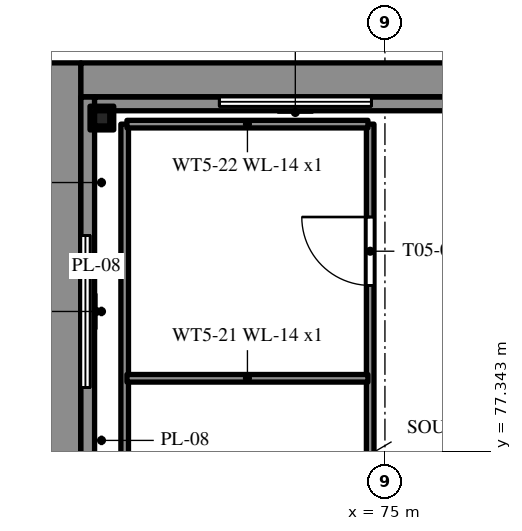
"""IFC4 building model, lengths in metres.
Left out: names, types, materials, properties, quantities, classifications, styles, units other than length and angle.
Written with IfcOpenShell. Run it as: python <this file> out.ifc"""

import sys

from ifc_helpers import new_model, si_unit, direction, frame, frame_2d, origin, origin_2d, place, context, subcontext, project, spatial, polyline, rectangle, hollow_rectangle, i_section, outline, extrude, element, fill, save


model = new_model("IFC4")
c1 = context("Model", 3, precision=1e-05, world=origin(), true_north=direction((0.0, 1.0)))
c2 = subcontext(c1, "Body", "Model", "MODEL_VIEW")
j1 = project(units=[si_unit("LENGTHUNIT", "METRE"), si_unit("PLANEANGLEUNIT", "RADIAN")], contexts=[c1])
p1 = place(None, origin())
s1 = spatial("IfcSite", under=j1, at=p1, CompositionType="ELEMENT")
p2 = place(p1, origin())
s2 = spatial("IfcBuilding", under=s1, at=p2, CompositionType="ELEMENT")
p3 = place(p2, frame((0.0, 0.0, 24.0)))
s3 = spatial("IfcBuildingStorey", under=s2, at=p3, CompositionType="ELEMENT", Elevation=24.0)
p4 = place(p3, frame((70.775, 55.4, 0.0), z_axis=(0.0, 0.0, 1.0), x_axis=(0.0, 1.0, 0.0)))
e1 = element("IfcWall", 1, at=p4, inside=s3, PredefinedType="SOLIDWALL", context=c2, shape_type="SweptSolid", body=[
    extrude(outline(polyline([(0.0, 0.0), (27.05, 0.0), (27.05, 0.5), (25.75, 0.5), (25.664, 0.5), (25.578, 0.5), (22.978, 0.5), (22.899, 0.5), (20.704, 0.5), (20.509, 0.5), (18.742, 0.5), (18.677, 0.5), (17.018, 0.5), (16.956, 0.5), (16.894, 0.5), (13.935, 0.5), (13.871, 0.5), (13.807, 0.5), (11.958, 0.5), (11.896, 0.5), (10.181, 0.5), (10.025, 0.5), (8.455, 0.5), (8.397, 0.5), (6.845, 0.5), (6.789, 0.5), (6.732, 0.5), (3.004, 0.5), (2.947, 0.5), (2.89, 0.5), (1.288, 0.5), (1.232, 0.5), (0.0, 0.5), (0.0, 0.0)])), frame((0.0, 0.225, 0.0), z_axis=(0.0, -1.0, 0.0), x_axis=(1.0, 0.0, 0.0)), (0.0, 0.0, 1.0), 0.45),
])
p5 = place(p3, frame((71.0, 82.225, 0.0), z_axis=(0.0, 0.0, 1.0), x_axis=(1.0, 0.0, 0.0)))
e2 = element("IfcWall", 2, at=p5, inside=s3, PredefinedType="SOLIDWALL", context=c2, shape_type="SweptSolid", body=[
    extrude(outline(polyline([(0.0, 0.0), (26.0, 0.0), (26.0, 0.5), (23.148, 0.5), (22.794, 0.5), (22.44, 0.5), (19.953, 0.5), (19.716, 0.5), (19.631, 0.5), (19.478, 0.5), (19.394, 0.5), (19.157, 0.5), (6.843, 0.5), (6.606, 0.5), (6.522, 0.5), (6.369, 0.5), (6.284, 0.5), (6.047, 0.5), (3.56, 0.5), (3.206, 0.5), (2.852, 0.5), (0.0, 0.5), (0.0, 0.0)])), frame((0.0, 0.225, 0.0), z_axis=(0.0, -1.0, 0.0), x_axis=(1.0, 0.0, 0.0)), (0.0, 0.0, 1.0), 0.45),
])
p6 = place(p3, frame((71.276, 81.724, 0.0), z_axis=(0.0, 0.0, 1.0), x_axis=(1.0, 0.0, 0.0)))
e3 = element("IfcColumn", 3, at=p6, inside=s3, PredefinedType="COLUMN", context=c2, shape_type="SweptSolid", body=[
    extrude(i_section(OverallWidth=0.312, OverallDepth=0.312, WebThickness=0.017, FlangeThickness=0.017, FilletRadius=0.016, at=origin_2d()), origin(), (0.0, 0.0, 1.0), 12.21),
])
p7 = place(p3, frame((71.576, 70.0, 0.0), z_axis=(0.0, 0.0, 1.0), x_axis=(0.0, 1.0, 0.0)))
e4 = element("IfcWall", 4, at=p7, inside=s3, PredefinedType="PARTITIONING", context=c2, shape_type="SweptSolid", body=[
    extrude(rectangle(XDim=11.644, YDim=0.1, at=frame_2d((5.822, 0.0))), origin(), (0.0, 0.0, 1.0), 3.2),
])
p8 = place(p3, frame((74.806, 70.0, 0.0), z_axis=(0.0, 0.0, 1.0), x_axis=(0.0, 1.0, 0.0)))
e5 = element("IfcWall", 5, at=p8, inside=s3, PredefinedType="PARTITIONING", context=c2, shape_type="SweptSolid", body=[
    extrude(rectangle(XDim=11.644, YDim=0.1, at=frame_2d((5.822, 0.0))), origin(), (0.0, 0.0, 1.0), 3.2),
])
p9 = place(p8, frame((1.75, 0.0, 0.0)))
e6 = element("IfcOpeningElement", 6, at=p9, cuts=e5, PredefinedType="OPENING", context=c2, shape_type="SweptSolid", body=[
    extrude(rectangle(XDim=0.9, YDim=2.1, at=frame_2d((0.45, 1.05))), frame((0.0, 0.06, 0.0), z_axis=(0.0, -1.0, 0.0), x_axis=(1.0, 0.0, 0.0)), (0.0, 0.0, 1.0), 0.12),
])
p10 = place(p8, frame((5.9, 0.0, 0.0)))
e7 = element("IfcOpeningElement", 7, at=p10, cuts=e5, PredefinedType="OPENING", context=c2, shape_type="SweptSolid", body=[
    extrude(rectangle(XDim=0.9, YDim=2.1, at=frame_2d((0.45, 1.05))), frame((0.0, 0.06, 0.0), z_axis=(0.0, -1.0, 0.0), x_axis=(1.0, 0.0, 0.0)), (0.0, 0.0, 1.0), 0.12),
])
p11 = place(p8, frame((9.522, 0.0, 0.0)))
e8 = element("IfcOpeningElement", 8, at=p11, cuts=e5, PredefinedType="OPENING", context=c2, shape_type="SweptSolid", body=[
    extrude(rectangle(XDim=0.9, YDim=2.1, at=frame_2d((0.45, 1.05))), frame((0.0, 0.06, 0.0), z_axis=(0.0, -1.0, 0.0), x_axis=(1.0, 0.0, 0.0)), (0.0, 0.0, 1.0), 0.12),
])
for number, where, z_axis, x_axis in (
    (9, (71.606, 78.3, 0.0), (0.0, 0.0, 1.0), (1.0, 0.0, 0.0)),
    (10, (71.606, 81.644, 0.0), (0.0, 0.0, 1.0), (1.0, 0.0, 0.0)),
):
    element("IfcWall", number, at=place(p3, frame(where, z_axis=z_axis, x_axis=x_axis)), inside=s3, PredefinedType="PARTITIONING", context=c2, shape_type="SweptSolid", body=[
        extrude(rectangle(XDim=3.17, YDim=0.1, at=frame_2d((1.585, 0.0))), origin(), (0.0, 0.0, 1.0), 3.2),
    ])
p12 = place(p3, frame((71.06, 56.12, 0.0), z_axis=(0.0, 0.0, 1.0), x_axis=(0.0, 1.0, 0.0)))
e11 = element("IfcWall", 11, at=p12, inside=s3, PredefinedType="STANDARD", context=c2, shape_type="SweptSolid", body=[
    extrude(rectangle(XDim=25.76, YDim=0.12, at=frame_2d((12.88, 0.0))), origin(), (0.0, 0.0, 1.0), 4.0),
])
p13 = place(p12, frame((1.701, 0.0, 1.4)))
e12 = element("IfcOpeningElement", 12, at=p13, cuts=e11, PredefinedType="OPENING", context=c2, shape_type="SweptSolid", body=[
    extrude(rectangle(XDim=2.0, YDim=1.2, at=frame_2d((1.0, 0.6))), frame((0.0, 0.07, 0.0), z_axis=(0.0, -1.0, 0.0), x_axis=(1.0, 0.0, 0.0)), (0.0, 0.0, 1.0), 0.14),
])
p14 = place(p12, frame((11.88, 0.0, 1.4)))
e13 = element("IfcOpeningElement", 13, at=p14, cuts=e11, PredefinedType="OPENING", context=c2, shape_type="SweptSolid", body=[
    extrude(rectangle(XDim=2.0, YDim=1.2, at=frame_2d((1.0, 0.6))), frame((0.0, 0.07, 0.0), z_axis=(0.0, -1.0, 0.0), x_axis=(1.0, 0.0, 0.0)), (0.0, 0.0, 1.0), 0.14),
])
p15 = place(p12, frame((22.059, 0.0, 1.4)))
e14 = element("IfcOpeningElement", 14, at=p15, cuts=e11, PredefinedType="OPENING", context=c2, shape_type="SweptSolid", body=[
    extrude(rectangle(XDim=2.0, YDim=1.2, at=frame_2d((1.0, 0.6))), frame((0.0, 0.07, 0.0), z_axis=(0.0, -1.0, 0.0), x_axis=(1.0, 0.0, 0.0)), (0.0, 0.0, 1.0), 0.14),
])
p16 = place(p12, frame((7.49, 0.0, 0.5)))
e15 = element("IfcOpeningElement", 15, at=p16, cuts=e11, PredefinedType="OPENING", context=c2, shape_type="SweptSolid", body=[
    extrude(rectangle(XDim=0.6, YDim=2.1, at=frame_2d((0.3, 1.05))), frame((0.0, 0.07, 0.0), z_axis=(0.0, -1.0, 0.0), x_axis=(1.0, 0.0, 0.0)), (0.0, 0.0, 1.0), 0.14),
])
p17 = place(p12, frame((17.67, 0.0, 0.5)))
e16 = element("IfcOpeningElement", 16, at=p17, cuts=e11, PredefinedType="OPENING", context=c2, shape_type="SweptSolid", body=[
    extrude(rectangle(XDim=0.6, YDim=2.1, at=frame_2d((0.3, 1.05))), frame((0.0, 0.07, 0.0), z_axis=(0.0, -1.0, 0.0), x_axis=(1.0, 0.0, 0.0)), (0.0, 0.0, 1.0), 0.14),
])
p18 = place(p3, frame((71.06, 56.12, 4.0), z_axis=(0.0, 0.0, 1.0), x_axis=(0.0, 1.0, 0.0)))
e17 = element("IfcWall", 17, at=p18, inside=s3, PredefinedType="STANDARD", context=c2, shape_type="SweptSolid", body=[
    extrude(rectangle(XDim=25.76, YDim=0.12, at=frame_2d((12.88, 0.0))), origin(), (0.0, 0.0, 1.0), 8.5),
])
p19 = place(p18, frame((1.701, 0.0, 2.4)))
e18 = element("IfcOpeningElement", 18, at=p19, cuts=e17, PredefinedType="OPENING", context=c2, shape_type="SweptSolid", body=[
    extrude(rectangle(XDim=2.0, YDim=1.2, at=frame_2d((1.0, 0.6))), frame((0.0, 0.07, 0.0), z_axis=(0.0, -1.0, 0.0), x_axis=(1.0, 0.0, 0.0)), (0.0, 0.0, 1.0), 0.14),
])
p20 = place(p18, frame((1.701, 0.0, 5.6)))
e19 = element("IfcOpeningElement", 19, at=p20, cuts=e17, PredefinedType="OPENING", context=c2, shape_type="SweptSolid", body=[
    extrude(rectangle(XDim=2.0, YDim=1.2, at=frame_2d((1.0, 0.6))), frame((0.0, 0.07, 0.0), z_axis=(0.0, -1.0, 0.0), x_axis=(1.0, 0.0, 0.0)), (0.0, 0.0, 1.0), 0.14),
])
p21 = place(p18, frame((11.88, 0.0, 2.4)))
e20 = element("IfcOpeningElement", 20, at=p21, cuts=e17, PredefinedType="OPENING", context=c2, shape_type="SweptSolid", body=[
    extrude(rectangle(XDim=2.0, YDim=1.2, at=frame_2d((1.0, 0.6))), frame((0.0, 0.07, 0.0), z_axis=(0.0, -1.0, 0.0), x_axis=(1.0, 0.0, 0.0)), (0.0, 0.0, 1.0), 0.14),
])
p22 = place(p18, frame((11.88, 0.0, 5.6)))
e21 = element("IfcOpeningElement", 21, at=p22, cuts=e17, PredefinedType="OPENING", context=c2, shape_type="SweptSolid", body=[
    extrude(rectangle(XDim=2.0, YDim=1.2, at=frame_2d((1.0, 0.6))), frame((0.0, 0.07, 0.0), z_axis=(0.0, -1.0, 0.0), x_axis=(1.0, 0.0, 0.0)), (0.0, 0.0, 1.0), 0.14),
])
p23 = place(p18, frame((22.059, 0.0, 2.4)))
e22 = element("IfcOpeningElement", 22, at=p23, cuts=e17, PredefinedType="OPENING", context=c2, shape_type="SweptSolid", body=[
    extrude(rectangle(XDim=2.0, YDim=1.2, at=frame_2d((1.0, 0.6))), frame((0.0, 0.07, 0.0), z_axis=(0.0, -1.0, 0.0), x_axis=(1.0, 0.0, 0.0)), (0.0, 0.0, 1.0), 0.14),
])
p24 = place(p18, frame((22.059, 0.0, 5.6)))
e23 = element("IfcOpeningElement", 23, at=p24, cuts=e17, PredefinedType="OPENING", context=c2, shape_type="SweptSolid", body=[
    extrude(rectangle(XDim=2.0, YDim=1.2, at=frame_2d((1.0, 0.6))), frame((0.0, 0.07, 0.0), z_axis=(0.0, -1.0, 0.0), x_axis=(1.0, 0.0, 0.0)), (0.0, 0.0, 1.0), 0.14),
])
p25 = place(p18, frame((7.49, 0.0, 1.5)))
e24 = element("IfcOpeningElement", 24, at=p25, cuts=e17, PredefinedType="OPENING", context=c2, shape_type="SweptSolid", body=[
    extrude(rectangle(XDim=0.6, YDim=2.1, at=frame_2d((0.3, 1.05))), frame((0.0, 0.07, 0.0), z_axis=(0.0, -1.0, 0.0), x_axis=(1.0, 0.0, 0.0)), (0.0, 0.0, 1.0), 0.14),
])
p26 = place(p18, frame((17.67, 0.0, 1.5)))
e25 = element("IfcOpeningElement", 25, at=p26, cuts=e17, PredefinedType="OPENING", context=c2, shape_type="SweptSolid", body=[
    extrude(rectangle(XDim=0.6, YDim=2.1, at=frame_2d((0.3, 1.05))), frame((0.0, 0.07, 0.0), z_axis=(0.0, -1.0, 0.0), x_axis=(1.0, 0.0, 0.0)), (0.0, 0.0, 1.0), 0.14),
])
p27 = place(p3, frame((71.0, 81.94, 0.0), z_axis=(0.0, 0.0, 1.0), x_axis=(1.0, 0.0, 0.0)))
e26 = element("IfcWall", 26, at=p27, inside=s3, PredefinedType="STANDARD", context=c2, shape_type="SweptSolid", body=[
    extrude(rectangle(XDim=26.0, YDim=0.12, at=frame_2d((13.0, 0.0))), origin(), (0.0, 0.0, 1.0), 4.0),
])
p28 = place(p27, frame((1.821, 0.0, 1.4)))
e27 = element("IfcOpeningElement", 27, at=p28, cuts=e26, PredefinedType="OPENING", context=c2, shape_type="SweptSolid", body=[
    extrude(rectangle(XDim=2.0, YDim=1.2, at=frame_2d((1.0, 0.6))), frame((0.0, 0.07, 0.0), z_axis=(0.0, -1.0, 0.0), x_axis=(1.0, 0.0, 0.0)), (0.0, 0.0, 1.0), 0.14),
])
p29 = place(p27, frame((12.0, 0.0, 1.4)))
e28 = element("IfcOpeningElement", 28, at=p29, cuts=e26, PredefinedType="OPENING", context=c2, shape_type="SweptSolid", body=[
    extrude(rectangle(XDim=2.0, YDim=1.2, at=frame_2d((1.0, 0.6))), frame((0.0, 0.07, 0.0), z_axis=(0.0, -1.0, 0.0), x_axis=(1.0, 0.0, 0.0)), (0.0, 0.0, 1.0), 0.14),
])
p30 = place(p27, frame((22.179, 0.0, 1.4)))
e29 = element("IfcOpeningElement", 29, at=p30, cuts=e26, PredefinedType="OPENING", context=c2, shape_type="SweptSolid", body=[
    extrude(rectangle(XDim=2.0, YDim=1.2, at=frame_2d((1.0, 0.6))), frame((0.0, 0.07, 0.0), z_axis=(0.0, -1.0, 0.0), x_axis=(1.0, 0.0, 0.0)), (0.0, 0.0, 1.0), 0.14),
])
p31 = place(p27, frame((7.61, 0.0, 0.5)))
e30 = element("IfcOpeningElement", 30, at=p31, cuts=e26, PredefinedType="OPENING", context=c2, shape_type="SweptSolid", body=[
    extrude(rectangle(XDim=0.6, YDim=2.1, at=frame_2d((0.3, 1.05))), frame((0.0, 0.07, 0.0), z_axis=(0.0, -1.0, 0.0), x_axis=(1.0, 0.0, 0.0)), (0.0, 0.0, 1.0), 0.14),
])
p32 = place(p27, frame((17.79, 0.0, 0.5)))
e31 = element("IfcOpeningElement", 31, at=p32, cuts=e26, PredefinedType="OPENING", context=c2, shape_type="SweptSolid", body=[
    extrude(rectangle(XDim=0.6, YDim=2.1, at=frame_2d((0.3, 1.05))), frame((0.0, 0.07, 0.0), z_axis=(0.0, -1.0, 0.0), x_axis=(1.0, 0.0, 0.0)), (0.0, 0.0, 1.0), 0.14),
])
p33 = place(p3, frame((71.0, 81.94, 4.0), z_axis=(0.0, 0.0, 1.0), x_axis=(1.0, 0.0, 0.0)))
e32 = element("IfcWall", 32, at=p33, inside=s3, PredefinedType="STANDARD", context=c2, shape_type="SweptSolid", body=[
    extrude(rectangle(XDim=26.0, YDim=0.12, at=frame_2d((13.0, 0.0))), origin(), (0.0, 0.0, 1.0), 8.5),
])
p34 = place(p33, frame((1.821, 0.0, 2.4)))
e33 = element("IfcOpeningElement", 33, at=p34, cuts=e32, PredefinedType="OPENING", context=c2, shape_type="SweptSolid", body=[
    extrude(rectangle(XDim=2.0, YDim=1.2, at=frame_2d((1.0, 0.6))), frame((0.0, 0.07, 0.0), z_axis=(0.0, -1.0, 0.0), x_axis=(1.0, 0.0, 0.0)), (0.0, 0.0, 1.0), 0.14),
])
p35 = place(p33, frame((1.821, 0.0, 5.6)))
e34 = element("IfcOpeningElement", 34, at=p35, cuts=e32, PredefinedType="OPENING", context=c2, shape_type="SweptSolid", body=[
    extrude(rectangle(XDim=2.0, YDim=1.2, at=frame_2d((1.0, 0.6))), frame((0.0, 0.07, 0.0), z_axis=(0.0, -1.0, 0.0), x_axis=(1.0, 0.0, 0.0)), (0.0, 0.0, 1.0), 0.14),
])
p36 = place(p33, frame((12.0, 0.0, 2.4)))
e35 = element("IfcOpeningElement", 35, at=p36, cuts=e32, PredefinedType="OPENING", context=c2, shape_type="SweptSolid", body=[
    extrude(rectangle(XDim=2.0, YDim=1.2, at=frame_2d((1.0, 0.6))), frame((0.0, 0.07, 0.0), z_axis=(0.0, -1.0, 0.0), x_axis=(1.0, 0.0, 0.0)), (0.0, 0.0, 1.0), 0.14),
])
p37 = place(p33, frame((12.0, 0.0, 5.6)))
e36 = element("IfcOpeningElement", 36, at=p37, cuts=e32, PredefinedType="OPENING", context=c2, shape_type="SweptSolid", body=[
    extrude(rectangle(XDim=2.0, YDim=1.2, at=frame_2d((1.0, 0.6))), frame((0.0, 0.07, 0.0), z_axis=(0.0, -1.0, 0.0), x_axis=(1.0, 0.0, 0.0)), (0.0, 0.0, 1.0), 0.14),
])
p38 = place(p33, frame((22.179, 0.0, 2.4)))
e37 = element("IfcOpeningElement", 37, at=p38, cuts=e32, PredefinedType="OPENING", context=c2, shape_type="SweptSolid", body=[
    extrude(rectangle(XDim=2.0, YDim=1.2, at=frame_2d((1.0, 0.6))), frame((0.0, 0.07, 0.0), z_axis=(0.0, -1.0, 0.0), x_axis=(1.0, 0.0, 0.0)), (0.0, 0.0, 1.0), 0.14),
])
p39 = place(p33, frame((22.179, 0.0, 5.6)))
e38 = element("IfcOpeningElement", 38, at=p39, cuts=e32, PredefinedType="OPENING", context=c2, shape_type="SweptSolid", body=[
    extrude(rectangle(XDim=2.0, YDim=1.2, at=frame_2d((1.0, 0.6))), frame((0.0, 0.07, 0.0), z_axis=(0.0, -1.0, 0.0), x_axis=(1.0, 0.0, 0.0)), (0.0, 0.0, 1.0), 0.14),
])
p40 = place(p33, frame((7.61, 0.0, 1.5)))
e39 = element("IfcOpeningElement", 39, at=p40, cuts=e32, PredefinedType="OPENING", context=c2, shape_type="SweptSolid", body=[
    extrude(rectangle(XDim=0.6, YDim=2.1, at=frame_2d((0.3, 1.05))), frame((0.0, 0.07, 0.0), z_axis=(0.0, -1.0, 0.0), x_axis=(1.0, 0.0, 0.0)), (0.0, 0.0, 1.0), 0.14),
])
p41 = place(p33, frame((17.79, 0.0, 1.5)))
e40 = element("IfcOpeningElement", 40, at=p41, cuts=e32, PredefinedType="OPENING", context=c2, shape_type="SweptSolid", body=[
    extrude(rectangle(XDim=0.6, YDim=2.1, at=frame_2d((0.3, 1.05))), frame((0.0, 0.07, 0.0), z_axis=(0.0, -1.0, 0.0), x_axis=(1.0, 0.0, 0.0)), (0.0, 0.0, 1.0), 0.14),
])
p42 = place(p3, frame((71.09, 56.0, 12.5), z_axis=(0.0, 0.0, 1.0), x_axis=(0.0, 1.0, 0.0)))
e41 = element("IfcWall", 41, at=p42, inside=s3, PredefinedType="PARAPET", context=c2, shape_type="SweptSolid", body=[
    extrude(rectangle(XDim=26.0, YDim=0.18, at=frame_2d((13.0, 0.0))), origin(), (0.0, 0.0, 1.0), 1.1),
])
p43 = place(p3, frame((71.18, 81.91, 12.5), z_axis=(0.0, 0.0, 1.0), x_axis=(1.0, 0.0, 0.0)))
e42 = element("IfcWall", 42, at=p43, inside=s3, PredefinedType="PARAPET", context=c2, shape_type="SweptSolid", body=[
    extrude(rectangle(XDim=25.64, YDim=0.18, at=frame_2d((12.82, 0.0))), origin(), (0.0, 0.0, 1.0), 1.1),
])
p44 = place(p3, frame((71.28, 81.72, 12.21), z_axis=(0.0, 0.0, 1.0), x_axis=(1.0, 0.0, 0.0)))
e43 = element("IfcColumn", 43, at=p44, inside=s3, PredefinedType="COLUMN", context=c2, shape_type="SweptSolid", body=[
    extrude(hollow_rectangle(XDim=0.2, YDim=0.2, WallThickness=0.01, InnerFilletRadius=0.01, OuterFilletRadius=0.02, at=origin_2d()), origin(), (0.0, 0.0, 1.0), 1.39),
])
p45 = place(p11, origin())
e44 = element("IfcDoor", 44, at=p45, inside=s3, OperationType="SINGLE_SWING_RIGHT", PredefinedType="DOOR", context=c2, shape_type="SweptSolid", body=[
    extrude(rectangle(XDim=0.9, YDim=2.1, at=frame_2d((0.45, 1.05))), frame((0.0, 0.025, 0.0), z_axis=(0.0, -1.0, 0.0), x_axis=(1.0, 0.0, 0.0)), (0.0, 0.0, 1.0), 0.05),
])
fill(e8, e44)
p46 = place(p15, origin())
e45 = element("IfcWindow", 45, at=p46, inside=s3, PartitioningType="SINGLE_PANEL", PredefinedType="WINDOW", context=c2, shape_type="SweptSolid", body=[
    extrude(rectangle(XDim=2.0, YDim=1.2, at=frame_2d((1.0, 0.6))), frame((0.0, 0.03, 0.0), z_axis=(0.0, -1.0, 0.0), x_axis=(1.0, 0.0, 0.0)), (0.0, 0.0, 1.0), 0.06),
])
fill(e14, e45)
p47 = place(p23, origin())
e46 = element("IfcWindow", 46, at=p47, inside=s3, PartitioningType="SINGLE_PANEL", PredefinedType="WINDOW", context=c2, shape_type="SweptSolid", body=[
    extrude(rectangle(XDim=2.0, YDim=1.2, at=frame_2d((1.0, 0.6))), frame((0.0, 0.03, 0.0), z_axis=(0.0, -1.0, 0.0), x_axis=(1.0, 0.0, 0.0)), (0.0, 0.0, 1.0), 0.06),
])
fill(e22, e46)
p48 = place(p24, origin())
e47 = element("IfcWindow", 47, at=p48, inside=s3, PartitioningType="SINGLE_PANEL", PredefinedType="WINDOW", context=c2, shape_type="SweptSolid", body=[
    extrude(rectangle(XDim=2.0, YDim=1.2, at=frame_2d((1.0, 0.6))), frame((0.0, 0.03, 0.0), z_axis=(0.0, -1.0, 0.0), x_axis=(1.0, 0.0, 0.0)), (0.0, 0.0, 1.0), 0.06),
])
fill(e23, e47)
p49 = place(p28, origin())
e48 = element("IfcWindow", 48, at=p49, inside=s3, PartitioningType="SINGLE_PANEL", PredefinedType="WINDOW", context=c2, shape_type="SweptSolid", body=[
    extrude(rectangle(XDim=2.0, YDim=1.2, at=frame_2d((1.0, 0.6))), frame((0.0, 0.03, 0.0), z_axis=(0.0, -1.0, 0.0), x_axis=(1.0, 0.0, 0.0)), (0.0, 0.0, 1.0), 0.06),
])
fill(e27, e48)
p50 = place(p34, origin())
e49 = element("IfcWindow", 49, at=p50, inside=s3, PartitioningType="SINGLE_PANEL", PredefinedType="WINDOW", context=c2, shape_type="SweptSolid", body=[
    extrude(rectangle(XDim=2.0, YDim=1.2, at=frame_2d((1.0, 0.6))), frame((0.0, 0.03, 0.0), z_axis=(0.0, -1.0, 0.0), x_axis=(1.0, 0.0, 0.0)), (0.0, 0.0, 1.0), 0.06),
])
fill(e33, e49)
p51 = place(p35, origin())
e50 = element("IfcWindow", 50, at=p51, inside=s3, PartitioningType="SINGLE_PANEL", PredefinedType="WINDOW", context=c2, shape_type="SweptSolid", body=[
    extrude(rectangle(XDim=2.0, YDim=1.2, at=frame_2d((1.0, 0.6))), frame((0.0, 0.03, 0.0), z_axis=(0.0, -1.0, 0.0), x_axis=(1.0, 0.0, 0.0)), (0.0, 0.0, 1.0), 0.06),
])
fill(e34, e50)
save(model, sys.argv[1])
